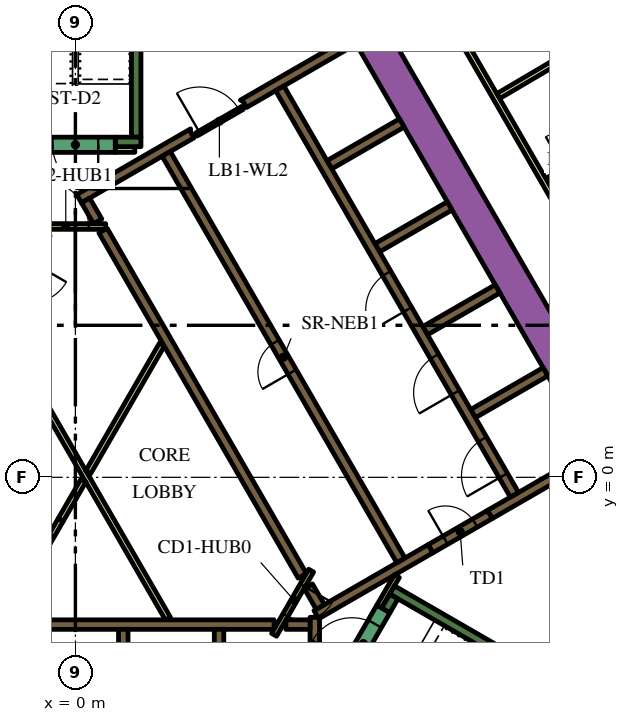
"""IFC4 building model, lengths in metres.
Left out: names, types, materials, properties, quantities, classifications, styles, units other than length and angle.
Written with IfcOpenShell. Run it as: python <this file> out.ifc"""

import sys

from ifc_helpers import new_model, si_unit, direction, frame, frame_2d, origin, place, context, subcontext, project, spatial, polyline, rectangle, outline, extrude, element, fill, save


model = new_model("IFC4")
c1 = context("Model", 3, precision=1e-05, world=origin(), true_north=direction((0.0, 1.0)))
c2 = subcontext(c1, "Body", "Model", "MODEL_VIEW")
j1 = project(units=[si_unit("LENGTHUNIT", "METRE"), si_unit("PLANEANGLEUNIT", "RADIAN")], contexts=[c1])
p1 = place(None, origin())
s1 = spatial("IfcSite", under=j1, at=p1, CompositionType="ELEMENT")
p2 = place(p1, origin())
s2 = spatial("IfcBuilding", under=s1, at=p2, CompositionType="ELEMENT")
p3 = place(p2, frame((0.0, 0.0, 47.1)))
s3 = spatial("IfcBuildingStorey", under=s2, at=p3, CompositionType="ELEMENT", Elevation=47.1)
p4 = place(p3, frame((6.776, 13.364, 0.0), z_axis=(0.0, 0.0, 1.0), x_axis=(0.500004177138, -0.8660229921, 0.0)))
e1 = element("IfcWall", 1, at=p4, inside=s3, PredefinedType="SOLIDWALL", context=c2, shape_type="SweptSolid", body=[
    extrude(rectangle(XDim=20.204, YDim=0.9, at=frame_2d((10.102, 0.0))), origin(), (0.0, 0.0, 1.0), 3.9),
])
p5 = place(p3, frame((11.943, -12.214, 0.0), z_axis=(0.0, 0.0, 1.0), x_axis=(0.49998092645, 0.866036415623, 0.0)))
e2 = element("IfcWall", 2, at=p5, inside=s3, PredefinedType="SOLIDWALL", context=c2, shape_type="SweptSolid", body=[
    extrude(rectangle(XDim=8.83, YDim=0.9, at=frame_2d((4.415, 0.0))), origin(), (0.0, 0.0, 1.0), 3.9),
])
p6 = place(p3, frame((8.334, -2.964, 0.0), z_axis=(0.0, 0.0, 1.0), x_axis=(0.866016039709, -0.500016218704, 0.0)))
e3 = element("IfcWall", 3, at=p6, inside=s3, PredefinedType="SOLIDWALL", context=c2, shape_type="SweptSolid", body=[
    extrude(rectangle(XDim=7.05, YDim=0.25, at=frame_2d((3.525, 0.0))), origin(), (0.0, 0.0, 1.0), 3.9),
])
p7 = place(p3, frame((8.168, -3.503, 0.0), z_axis=(0.0, 0.0, 1.0), x_axis=(0.49972245349, 0.866185586049, 0.0)))
e4 = element("IfcWall", 4, at=p7, inside=s3, PredefinedType="SOLIDWALL", context=c2, shape_type="SweptSolid", body=[
    extrude(rectangle(XDim=0.425, YDim=0.25, at=frame_2d((0.212, 0.0))), origin(), (0.0, 0.0, 1.0), 3.9),
])
p8 = place(p3, frame((1.6, 8.95, 0.0), z_axis=(0.0, 0.0, 1.0), x_axis=(0.0, 1.0, 0.0)))
e5 = element("IfcWall", 5, at=p8, inside=s3, PredefinedType="SOLIDWALL", context=c2, shape_type="SweptSolid", body=[
    extrude(rectangle(XDim=6.8, YDim=0.25, at=frame_2d((3.4, 0.0))), origin(), (0.0, 0.0, 1.0), 3.9),
])
p9 = place(p3, frame((1.05, 8.825, 0.0), z_axis=(0.0, 0.0, 1.0), x_axis=(1.0, 0.0, 0.0)))
e6 = element("IfcWall", 6, at=p9, inside=s3, PredefinedType="SOLIDWALL", context=c2, shape_type="SweptSolid", body=[
    extrude(rectangle(XDim=0.675, YDim=0.25, at=frame_2d((0.337, 0.0))), origin(), (0.0, 0.0, 1.0), 3.9),
])
p10 = place(p3, frame((-5.259, -3.875, 0.0), z_axis=(0.0, 0.0, 1.0), x_axis=(1.0, 0.0, 0.0)))
e7 = element("IfcWall", 7, at=p10, inside=s3, PredefinedType="SOLIDWALL", context=c2, shape_type="SweptSolid", body=[
    extrude(rectangle(XDim=10.489, YDim=0.25, at=frame_2d((5.244, 0.0))), origin(), (0.0, 0.0, 1.0), 3.9),
])
for number, where, z_axis, x_axis in (
    (8, (3.78, -4.0, 0.0), (0.0, 0.0, 1.0), (0.0, -1.0, 0.0)),
    (9, (1.26, -4.0, 0.0), (0.0, 0.0, 1.0), (0.0, -1.0, 0.0)),
):
    element("IfcWall", number, at=place(p3, frame(where, z_axis=z_axis, x_axis=x_axis)), inside=s3, PredefinedType="SOLIDWALL", context=c2, shape_type="SweptSolid", body=[
        extrude(rectangle(XDim=2.2, YDim=0.25, at=frame_2d((1.1, 0.0))), origin(), (0.0, 0.0, 1.0), 3.9),
    ])
p11 = place(p3, frame((6.3, -7.27, 0.0), z_axis=(0.0, 0.0, 1.0), x_axis=(0.0, 1.0, 0.0)))
e10 = element("IfcWall", 10, at=p11, inside=s3, PredefinedType="SOLIDWALL", context=c2, shape_type="SweptSolid", body=[
    extrude(rectangle(XDim=3.586, YDim=0.25, at=frame_2d((1.793, 0.0))), origin(), (0.0, 0.0, 1.0), 3.9),
])
p12 = place(p3, frame((5.538, -3.875, 0.0), z_axis=(0.0, 0.0, 1.0), x_axis=(1.0, 0.0, 0.0)))
e11 = element("IfcWall", 11, at=p12, inside=s3, PredefinedType="SOLIDWALL", context=c2, shape_type="SweptSolid", body=[
    extrude(rectangle(XDim=0.637, YDim=0.25, at=frame_2d((0.318, 0.0))), origin(), (0.0, 0.0, 1.0), 3.9),
])
p13 = place(p3, frame((10.464, 1.677, 0.0), z_axis=(0.0, 0.0, 1.0), x_axis=(0.86605622881, 0.499946605688, 0.0)))
e12 = element("IfcWall", 12, at=p13, inside=s3, PredefinedType="SOLIDWALL", context=c2, shape_type="SweptSolid", body=[
    extrude(rectangle(XDim=2.2, YDim=0.25, at=frame_2d((1.1, 0.0))), origin(), (0.0, 0.0, 1.0), 3.9),
])
p14 = place(p3, frame((13.629, 0.594, 0.0), z_axis=(0.0, 0.0, 1.0), x_axis=(-0.86602790099, -0.499995674689, 0.0)))
e13 = element("IfcWall", 13, at=p14, inside=s3, PredefinedType="SOLIDWALL", context=c2, shape_type="SweptSolid", body=[
    extrude(rectangle(XDim=3.146, YDim=0.25, at=frame_2d((1.573, 0.0))), origin(), (0.0, 0.0, 1.0), 3.9),
])
p15 = place(p3, frame((9.346, -1.879, 0.0), z_axis=(0.0, 0.0, 1.0), x_axis=(-0.866048528039, -0.499959945477, 0.0)))
e14 = element("IfcWall", 14, at=p15, inside=s3, PredefinedType="SOLIDWALL", context=c2, shape_type="SweptSolid", body=[
    extrude(rectangle(XDim=3.47, YDim=0.25, at=frame_2d((1.735, 0.0))), origin(), (0.0, 0.0, 1.0), 3.9),
])
p16 = place(p3, frame((6.13, -2.867, 0.0), z_axis=(0.0, 0.0, 1.0), x_axis=(0.500160776593, -0.865932559475, 0.0)))
e15 = element("IfcWall", 15, at=p16, inside=s3, PredefinedType="SOLIDWALL", context=c2, shape_type="SweptSolid", body=[
    extrude(rectangle(XDim=0.627, YDim=0.25, at=frame_2d((0.313, 0.0))), origin(), (0.0, 0.0, 1.0), 3.9),
])
for number, where, z_axis, x_axis in (
    (16, (9.204, 3.859, 0.0), (0.0, 0.0, 1.0), (0.866, 0.5, 0.0)),
    (17, (7.944, 6.041, 0.0), (0.0, 0.0, 1.0), (0.866, 0.5, 0.0)),
    (18, (6.684, 8.224, 0.0), (0.0, 0.0, 1.0), (0.866, 0.5, 0.0)),
):
    element("IfcWall", number, at=place(p3, frame(where, z_axis=z_axis, x_axis=x_axis)), inside=s3, PredefinedType="SOLIDWALL", context=c2, shape_type="SweptSolid", body=[
        extrude(rectangle(XDim=2.2, YDim=0.25, at=frame_2d((1.1, 0.0))), origin(), (0.0, 0.0, 1.0), 3.9),
    ])
p17 = place(p3, origin())
e19 = element("IfcWall", 19, at=p17, inside=s3, PredefinedType="SOLIDWALL", context=c2, shape_type="SweptSolid", body=[
    extrude(outline(polyline([(2.776, 8.733), (2.499, 8.573), (2.498, 8.573), (2.498, 8.573), (2.282, 8.448), (2.282, 8.448), (0.377, 7.348), (0.16, 7.223), (0.035, 7.439), (3.032, 9.169), (3.03, 9.152), (3.03, 9.133), (3.031, 9.113), (3.035, 9.094), (3.04, 9.075), (3.047, 9.057), (3.056, 9.039), (3.119, 8.931), (2.776, 8.733)])), origin(), (0.0, 0.0, 1.0), 3.9),
])
e20 = element("IfcWall", 20, at=p17, inside=s3, PredefinedType="SOLIDWALL", context=c2, shape_type="SweptSolid", body=[
    extrude(outline(polyline([(5.27, 10.173), (5.27, 10.173), (4.683, 9.834), (4.504, 9.731), (4.442, 9.839), (4.431, 9.856), (4.419, 9.871), (4.406, 9.885), (4.39, 9.898), (4.374, 9.909), (4.357, 9.918), (4.341, 9.925), (7.266, 11.614), (7.391, 11.398), (5.486, 10.298), (5.486, 10.298), (5.27, 10.173), (5.27, 10.173)])), origin(), (0.0, 0.0, 1.0), 3.9),
])
p18 = place(p3, frame((0.268, 7.285, 0.0), z_axis=(0.0, 0.0, 1.0), x_axis=(0.500098681536, -0.865968422476, 0.0)))
e21 = element("IfcWall", 21, at=p18, inside=s3, PredefinedType="SOLIDWALL", context=c2, shape_type="SweptSolid", body=[
    extrude(rectangle(XDim=0.636, YDim=0.25, at=frame_2d((0.318, 0.0))), origin(), (0.0, 0.0, 1.0), 3.9),
])
p19 = place(p3, frame((5.97, -2.591, 0.0), z_axis=(0.0, 0.0, 1.0), x_axis=(-0.499994469932, 0.866028596547, 0.0)))
e22 = element("IfcWall", 22, at=p19, inside=s3, PredefinedType="SOLIDWALL", context=c2, shape_type="SweptSolid", body=[
    extrude(rectangle(XDim=10.488, YDim=0.25, at=frame_2d((5.244, 0.0))), origin(), (0.0, 0.0, 1.0), 3.9),
])
p20 = place(p3, frame((8.459, -2.599, 0.0), z_axis=(0.0, 0.0, 1.0), x_axis=(-0.500041054325, -0.866001699761, 0.0)))
e23 = element("IfcWall", 23, at=p20, inside=s3, PredefinedType="PARTITIONING", context=c2, shape_type="SweptSolid", body=[
    extrude(rectangle(XDim=0.929, YDim=0.15, at=frame_2d((0.464, 0.0))), origin(), (0.0, 0.0, 1.0), 3.9),
])
p21 = place(p3, frame((2.435, -3.718, 0.0), z_axis=(0.0, 0.0, 1.0), x_axis=(-0.499985176046, 0.866033962229, 0.0)))
e24 = element("IfcWall", 24, at=p21, inside=s3, PredefinedType="PARTITIONING", context=c2, shape_type="SweptSolid", body=[
    extrude(rectangle(XDim=8.875, YDim=0.15, at=frame_2d((4.438, 0.0))), origin(), (0.0, 0.0, 1.0), 2.75),
])
p22 = place(p3, frame((0.336, 0.132, 0.0), z_axis=(0.0, 0.0, 1.0), x_axis=(0.500001957507, 0.866024273614, 0.0)))
e25 = element("IfcWall", 25, at=p22, inside=s3, PredefinedType="PARTITIONING", context=c2, shape_type="SweptSolid", body=[
    extrude(rectangle(XDim=3.881, YDim=0.15, at=frame_2d((1.941, 0.0))), origin(), (0.0, 0.0, 1.0), 2.75),
])
p23 = place(p3, frame((-0.387, -1.121, 0.0), z_axis=(0.0, 0.0, 1.0), x_axis=(0.500057179532, 0.865992388649, 0.0)))
e26 = element("IfcWall", 26, at=p23, inside=s3, PredefinedType="PARTITIONING", context=c2, shape_type="SweptSolid", body=[
    extrude(rectangle(XDim=1.199, YDim=0.15, at=frame_2d((0.6, 0.0))), origin(), (0.0, 0.0, 1.0), 2.75),
])
p24 = place(p3, frame((1.05, 8.625, 0.0), z_axis=(0.0, 0.0, 1.0), x_axis=(1.0, 0.0, 0.0)))
e27 = element("IfcWall", 27, at=p24, inside=s3, PredefinedType="PARTITIONING", context=c2, shape_type="SweptSolid", body=[
    extrude(rectangle(XDim=0.514, YDim=0.15, at=frame_2d((0.257, 0.0))), origin(), (0.0, 0.0, 1.0), 2.75),
])
p25 = place(p3, frame((11.553, -0.46, 0.0), z_axis=(0.0, 0.0, 1.0), x_axis=(-0.500006514828, 0.866021642414, 0.0)))
e28 = element("IfcWall", 28, at=p25, inside=s3, PredefinedType="SOLIDWALL", context=c2, shape_type="SweptSolid", body=[
    extrude(rectangle(XDim=12.35, YDim=0.25, at=frame_2d((6.175, 0.0))), origin(), (0.0, 0.0, 1.0), 3.9),
])
p26 = place(p25, frame((0.585, 0.0, 0.0)))
e29 = element("IfcOpeningElement", 29, at=p26, cuts=e28, PredefinedType="OPENING", context=c2, shape_type="SweptSolid", body=[
    extrude(rectangle(XDim=1.1, YDim=2.1, at=frame_2d((0.55, 1.05))), frame((0.0, 0.135, 0.0), z_axis=(0.0, -1.0, 0.0), x_axis=(1.0, 0.0, 0.0)), (0.0, 0.0, 1.0), 0.27),
])
p27 = place(p25, frame((3.105, 0.0, 0.0)))
e30 = element("IfcOpeningElement", 30, at=p27, cuts=e28, PredefinedType="OPENING", context=c2, shape_type="SweptSolid", body=[
    extrude(rectangle(XDim=1.1, YDim=2.1, at=frame_2d((0.55, 1.05))), frame((0.0, 0.135, 0.0), z_axis=(0.0, -1.0, 0.0), x_axis=(1.0, 0.0, 0.0)), (0.0, 0.0, 1.0), 0.27),
])
p28 = place(p25, frame((5.625, 0.0, 0.0)))
e31 = element("IfcOpeningElement", 31, at=p28, cuts=e28, PredefinedType="OPENING", context=c2, shape_type="SweptSolid", body=[
    extrude(rectangle(XDim=1.1, YDim=2.1, at=frame_2d((0.55, 1.05))), frame((0.0, 0.135, 0.0), z_axis=(0.0, -1.0, 0.0), x_axis=(1.0, 0.0, 0.0)), (0.0, 0.0, 1.0), 0.27),
])
p29 = place(p3, frame((8.565, -2.185, 0.0), z_axis=(0.0, 0.0, 1.0), x_axis=(-0.499997954832, 0.866026584559, 0.0)))
e32 = element("IfcWall", 32, at=p29, inside=s3, PredefinedType="SOLIDWALL", context=c2, shape_type="SweptSolid", body=[
    extrude(rectangle(XDim=12.35, YDim=0.25, at=frame_2d((6.175, 0.0))), origin(), (0.0, 0.0, 1.0), 3.9),
])
p30 = place(p29, frame((5.725, 0.0, 0.0)))
e33 = element("IfcOpeningElement", 33, at=p30, cuts=e32, PredefinedType="OPENING", context=c2, shape_type="SweptSolid", body=[
    extrude(rectangle(XDim=0.9, YDim=2.1, at=frame_2d((0.45, 1.05))), frame((0.0, 0.135, 0.0), z_axis=(0.0, -1.0, 0.0), x_axis=(1.0, 0.0, 0.0)), (0.0, 0.0, 1.0), 0.27),
])
p31 = place(p3, frame((7.053, -5.284, 0.0), z_axis=(0.0, 0.0, 1.0), x_axis=(0.500078061341, 0.865980330357, 0.0)))
e34 = element("IfcWall", 34, at=p31, inside=s3, PredefinedType="SOLIDWALL", context=c2, shape_type="SweptSolid", body=[
    extrude(rectangle(XDim=2.1, YDim=0.4, at=frame_2d((1.05, 0.0))), origin(), (0.0, 0.0, 1.0), 3.9),
])
p32 = place(p31, frame((0.45, 0.0, 0.0)))
e35 = element("IfcOpeningElement", 35, at=p32, cuts=e34, PredefinedType="OPENING", context=c2, shape_type="SweptSolid", body=[
    extrude(rectangle(XDim=1.2, YDim=2.1, at=frame_2d((0.6, 1.05))), frame((0.0, 0.21, 0.0), z_axis=(0.0, -1.0, 0.0), x_axis=(1.0, 0.0, 0.0)), (0.0, 0.0, 1.0), 0.42),
])
p33 = place(p3, frame((9.346, -1.879, 0.0), z_axis=(0.0, 0.0, 1.0), x_axis=(0.866047807691, 0.499961193289, 0.0)))
e36 = element("IfcWall", 36, at=p33, inside=s3, PredefinedType="SOLIDWALL", context=c2, shape_type="SweptSolid", body=[
    extrude(rectangle(XDim=1.8, YDim=0.25, at=frame_2d((0.9, 0.0))), origin(), (0.0, 0.0, 1.0), 3.9),
])
p34 = place(p33, frame((0.45, 0.0, 0.0)))
e37 = element("IfcOpeningElement", 37, at=p34, cuts=e36, PredefinedType="OPENING", context=c2, shape_type="SweptSolid", body=[
    extrude(rectangle(XDim=0.9, YDim=2.1, at=frame_2d((0.45, 1.05))), frame((0.0, 0.135, 0.0), z_axis=(0.0, -1.0, 0.0), x_axis=(1.0, 0.0, 0.0)), (0.0, 0.0, 1.0), 0.27),
])
p35 = place(p3, frame((1.05, 8.75, 0.0), z_axis=(0.0, 0.0, 1.0), x_axis=(-1.0, 0.0, 0.0)))
e38 = element("IfcWall", 38, at=p35, inside=s3, PredefinedType="SOLIDWALL", context=c2, shape_type="SweptSolid", body=[
    extrude(rectangle(XDim=2.1, YDim=0.4, at=frame_2d((1.05, 0.0))), origin(), (0.0, 0.0, 1.0), 3.9),
])
p36 = place(p35, frame((0.45, 0.0, 0.0)))
e39 = element("IfcOpeningElement", 39, at=p36, cuts=e38, PredefinedType="OPENING", context=c2, shape_type="SweptSolid", body=[
    extrude(rectangle(XDim=1.2, YDim=2.1, at=frame_2d((0.6, 1.05))), frame((0.0, 0.21, 0.0), z_axis=(0.0, -1.0, 0.0), x_axis=(1.0, 0.0, 0.0)), (0.0, 0.0, 1.0), 0.42),
])
p37 = place(p3, frame((6.203, -2.456, 0.0), z_axis=(0.0, 0.0, 1.0), x_axis=(-0.500043961785, -0.866000020948, 0.0)))
e40 = element("IfcWall", 40, at=p37, inside=s3, PredefinedType="PARTITIONING", context=c2, shape_type="SweptSolid", body=[
    extrude(rectangle(XDim=1.95, YDim=0.15, at=frame_2d((0.975, 0.0))), origin(), (0.0, 0.0, 1.0), 3.9),
])
p38 = place(p37, frame((0.45, 0.0, 0.0)))
e41 = element("IfcOpeningElement", 41, at=p38, cuts=e40, PredefinedType="OPENING", context=c2, shape_type="SweptSolid", body=[
    extrude(rectangle(XDim=0.9, YDim=2.1, at=frame_2d((0.45, 1.05))), frame((0.0, 0.085, 0.0), z_axis=(0.0, -1.0, 0.0), x_axis=(1.0, 0.0, 0.0)), (0.0, 0.0, 1.0), 0.17),
])
p39 = place(p3, frame((-1.303, 6.6, 0.0), z_axis=(0.0, 0.0, 1.0), x_axis=(1.0, 0.0, 0.0)))
e42 = element("IfcWall", 42, at=p39, inside=s3, PredefinedType="PARTITIONING", context=c2, shape_type="SweptSolid", body=[
    extrude(rectangle(XDim=2.1, YDim=0.15, at=frame_2d((1.05, 0.0))), origin(), (0.0, 0.0, 1.0), 3.9),
])
p40 = place(p39, frame((0.45, 0.0, 0.0)))
e43 = element("IfcOpeningElement", 43, at=p40, cuts=e42, PredefinedType="OPENING", context=c2, shape_type="SweptSolid", body=[
    extrude(rectangle(XDim=1.2, YDim=2.1, at=frame_2d((0.6, 1.05))), frame((0.0, 0.085, 0.0), z_axis=(0.0, -1.0, 0.0), x_axis=(1.0, 0.0, 0.0)), (0.0, 0.0, 1.0), 0.17),
])
p41 = place(p3, frame((3.183, 9.02, 0.0), z_axis=(0.0, 0.0, 1.0), x_axis=(0.866034573852, 0.49998411664, 0.0)))
e44 = element("IfcWall", 44, at=p41, inside=s3, PredefinedType="PARTITIONING", context=c2, shape_type="SweptSolid", body=[
    extrude(rectangle(XDim=1.4, YDim=0.09, at=frame_2d((0.7, 0.0))), origin(), (0.0, 0.0, 1.0), 2.75),
])
p42 = place(p41, frame((0.1, 0.0, 0.0)))
e45 = element("IfcOpeningElement", 45, at=p42, cuts=e44, PredefinedType="OPENING", context=c2, shape_type="SweptSolid", body=[
    extrude(rectangle(XDim=1.2, YDim=2.1, at=frame_2d((0.6, 1.05))), frame((0.0, 0.055, 0.0), z_axis=(0.0, -1.0, 0.0), x_axis=(1.0, 0.0, 0.0)), (0.0, 0.0, 1.0), 0.11),
])
p43 = place(p3, frame((-1.287, -2.679, 0.0), z_axis=(0.0, 0.0, 1.0), x_axis=(0.499961193289, 0.866047807691, 0.0)))
e46 = element("IfcWall", 46, at=p43, inside=s3, PredefinedType="PARTITIONING", context=c2, shape_type="SweptSolid", body=[
    extrude(rectangle(XDim=1.8, YDim=0.15, at=frame_2d((0.9, 0.0))), origin(), (0.0, 0.0, 1.0), 2.75),
])
p44 = place(p43, frame((0.45, 0.0, 0.0)))
e47 = element("IfcOpeningElement", 47, at=p44, cuts=e46, PredefinedType="OPENING", context=c2, shape_type="SweptSolid", body=[
    extrude(rectangle(XDim=0.9, YDim=2.1, at=frame_2d((0.45, 1.05))), frame((0.0, 0.085, 0.0), z_axis=(0.0, -1.0, 0.0), x_axis=(1.0, 0.0, 0.0)), (0.0, 0.0, 1.0), 0.17),
])
p45 = place(p3, frame((6.163, 18.475, 0.0), z_axis=(0.0, 0.0, 1.0), x_axis=(0.500001317485, -0.866024643133, 0.0)))
e48 = element("IfcWall", 48, at=p45, inside=s3, PredefinedType="PARTITIONING", context=c2, shape_type="SweptSolid", body=[
    extrude(rectangle(XDim=25.767, YDim=0.15, at=frame_2d((12.883, 0.0))), origin(), (0.0, 0.0, 1.0), 2.75),
])
p46 = place(p45, frame((24.586, 0.0, 0.0)))
e49 = element("IfcOpeningElement", 49, at=p46, cuts=e48, PredefinedType="OPENING", context=c2, shape_type="SweptSolid", body=[
    extrude(rectangle(XDim=1.0, YDim=2.1, at=frame_2d((0.5, 1.05))), frame((0.0, 0.085, 0.0), z_axis=(0.0, -1.0, 0.0), x_axis=(1.0, 0.0, 0.0)), (0.0, 0.0, 1.0), 0.17),
])
p47 = place(p45, frame((16.196, 0.0, 0.0)))
e50 = element("IfcOpeningElement", 50, at=p47, cuts=e48, PredefinedType="OPENING", context=c2, shape_type="SweptSolid", body=[
    extrude(rectangle(XDim=1.0, YDim=2.1, at=frame_2d((0.5, 1.05))), frame((0.0, 0.085, 0.0), z_axis=(0.0, -1.0, 0.0), x_axis=(1.0, 0.0, 0.0)), (0.0, 0.0, 1.0), 0.17),
])
p48 = place(p45, frame((14.789, 0.0, 0.0)))
e51 = element("IfcOpeningElement", 51, at=p48, cuts=e48, PredefinedType="OPENING", context=c2, shape_type="SweptSolid", body=[
    extrude(rectangle(XDim=1.1, YDim=2.1, at=frame_2d((0.55, 1.05))), frame((0.0, 0.085, 0.0), z_axis=(0.0, -1.0, 0.0), x_axis=(1.0, 0.0, 0.0)), (0.0, 0.0, 1.0), 0.17),
])
p49 = place(p45, frame((3.698, 0.0, 0.0)))
e52 = element("IfcOpeningElement", 52, at=p49, cuts=e48, PredefinedType="OPENING", context=c2, shape_type="SweptSolid", body=[
    extrude(rectangle(XDim=1.0, YDim=2.1, at=frame_2d((0.5, 1.05))), frame((0.0, 0.085, 0.0), z_axis=(0.0, -1.0, 0.0), x_axis=(1.0, 0.0, 0.0)), (0.0, 0.0, 1.0), 0.17),
])
p50 = place(p45, frame((2.391, 0.0, 0.0)))
e53 = element("IfcOpeningElement", 53, at=p50, cuts=e48, PredefinedType="OPENING", context=c2, shape_type="SweptSolid", body=[
    extrude(rectangle(XDim=1.0, YDim=2.1, at=frame_2d((0.5, 1.05))), frame((0.0, 0.085, 0.0), z_axis=(0.0, -1.0, 0.0), x_axis=(1.0, 0.0, 0.0)), (0.0, 0.0, 1.0), 0.17),
])
p51 = place(p3, frame((17.856, 13.999, 0.0), z_axis=(0.0, 0.0, 1.0), x_axis=(-0.861371519381, -0.507975497047, 0.0)))
e54 = element("IfcWall", 54, at=p51, inside=s3, PredefinedType="PARTITIONING", context=c2, shape_type="SweptSolid", body=[
    extrude(rectangle(XDim=7.804, YDim=0.15, at=frame_2d((3.902, 0.0))), origin(), (0.0, 0.0, 1.0), 2.75),
])
p52 = place(p3, frame((12.402, 7.819, 0.0), z_axis=(0.0, 0.0, 1.0), x_axis=(0.866034573852, 0.49998411664, 0.0)))
e55 = element("IfcWall", 55, at=p52, inside=s3, PredefinedType="PARTITIONING", context=c2, shape_type="SweptSolid", body=[
    extrude(rectangle(XDim=2.8, YDim=0.1, at=frame_2d((1.4, 0.0))), origin(), (0.0, 0.0, 1.0), 2.75),
])
p53 = place(p52, frame((0.55, 0.0, 0.0)))
e56 = element("IfcOpeningElement", 56, at=p53, cuts=e55, PredefinedType="OPENING", context=c2, shape_type="SweptSolid", body=[
    extrude(rectangle(XDim=1.0, YDim=2.1, at=frame_2d((0.5, 1.05))), frame((0.0, 0.06, 0.0), z_axis=(0.0, -1.0, 0.0), x_axis=(1.0, 0.0, 0.0)), (0.0, 0.0, 1.0), 0.12),
])
p54 = place(p26, origin())
e57 = element("IfcDoor", 57, at=p54, inside=s3, OperationType="DOUBLE_DOOR_SLIDING", PredefinedType="DOOR", context=c2, shape_type="SweptSolid", body=[
    extrude(rectangle(XDim=1.1, YDim=2.1, at=frame_2d((0.55, 1.05))), frame((0.0, 0.025, 0.0), z_axis=(0.0, -1.0, 0.0), x_axis=(1.0, 0.0, 0.0)), (0.0, 0.0, 1.0), 0.05),
])
fill(e29, e57)
p55 = place(p27, origin())
e58 = element("IfcDoor", 58, at=p55, inside=s3, OperationType="DOUBLE_DOOR_SLIDING", PredefinedType="DOOR", context=c2, shape_type="SweptSolid", body=[
    extrude(rectangle(XDim=1.1, YDim=2.1, at=frame_2d((0.55, 1.05))), frame((0.0, 0.025, 0.0), z_axis=(0.0, -1.0, 0.0), x_axis=(1.0, 0.0, 0.0)), (0.0, 0.0, 1.0), 0.05),
])
fill(e30, e58)
p56 = place(p28, origin())
e59 = element("IfcDoor", 59, at=p56, inside=s3, OperationType="DOUBLE_DOOR_SLIDING", PredefinedType="DOOR", context=c2, shape_type="SweptSolid", body=[
    extrude(rectangle(XDim=1.1, YDim=2.1, at=frame_2d((0.55, 1.05))), frame((0.0, 0.025, 0.0), z_axis=(0.0, -1.0, 0.0), x_axis=(1.0, 0.0, 0.0)), (0.0, 0.0, 1.0), 0.05),
])
fill(e31, e59)
p57 = place(p30, origin())
e60 = element("IfcDoor", 60, at=p57, inside=s3, OperationType="SINGLE_SWING_LEFT", PredefinedType="DOOR", context=c2, shape_type="SweptSolid", body=[
    extrude(rectangle(XDim=0.9, YDim=2.1, at=frame_2d((0.45, 1.05))), frame((0.0, 0.025, 0.0), z_axis=(0.0, -1.0, 0.0), x_axis=(1.0, 0.0, 0.0)), (0.0, 0.0, 1.0), 0.05),
])
fill(e33, e60)
p58 = place(p32, origin())
e61 = element("IfcDoor", 61, at=p58, inside=s3, OperationType="SINGLE_SWING_LEFT", PredefinedType="DOOR", context=c2, shape_type="SweptSolid", body=[
    extrude(rectangle(XDim=1.2, YDim=2.1, at=frame_2d((0.6, 1.05))), frame((0.0, 0.025, 0.0), z_axis=(0.0, -1.0, 0.0), x_axis=(1.0, 0.0, 0.0)), (0.0, 0.0, 1.0), 0.05),
])
fill(e35, e61)
p59 = place(p34, origin())
e62 = element("IfcDoor", 62, at=p59, inside=s3, OperationType="SINGLE_SWING_LEFT", PredefinedType="DOOR", context=c2, shape_type="SweptSolid", body=[
    extrude(rectangle(XDim=0.9, YDim=2.1, at=frame_2d((0.45, 1.05))), frame((0.0, 0.025, 0.0), z_axis=(0.0, -1.0, 0.0), x_axis=(1.0, 0.0, 0.0)), (0.0, 0.0, 1.0), 0.05),
])
fill(e37, e62)
p60 = place(p36, origin())
e63 = element("IfcDoor", 63, at=p60, inside=s3, OperationType="SINGLE_SWING_LEFT", PredefinedType="DOOR", context=c2, shape_type="SweptSolid", body=[
    extrude(rectangle(XDim=1.2, YDim=2.1, at=frame_2d((0.6, 1.05))), frame((0.0, 0.025, 0.0), z_axis=(0.0, -1.0, 0.0), x_axis=(1.0, 0.0, 0.0)), (0.0, 0.0, 1.0), 0.05),
])
fill(e39, e63)
p61 = place(p38, origin())
e64 = element("IfcDoor", 64, at=p61, inside=s3, OperationType="SINGLE_SWING_LEFT", PredefinedType="DOOR", context=c2, shape_type="SweptSolid", body=[
    extrude(rectangle(XDim=0.9, YDim=2.1, at=frame_2d((0.45, 1.05))), frame((0.0, 0.025, 0.0), z_axis=(0.0, -1.0, 0.0), x_axis=(1.0, 0.0, 0.0)), (0.0, 0.0, 1.0), 0.05),
])
fill(e41, e64)
p62 = place(p40, origin())
e65 = element("IfcDoor", 65, at=p62, inside=s3, OperationType="SINGLE_SWING_LEFT", PredefinedType="DOOR", context=c2, shape_type="SweptSolid", body=[
    extrude(rectangle(XDim=1.2, YDim=2.1, at=frame_2d((0.6, 1.05))), frame((0.0, 0.025, 0.0), z_axis=(0.0, -1.0, 0.0), x_axis=(1.0, 0.0, 0.0)), (0.0, 0.0, 1.0), 0.05),
])
fill(e43, e65)
p63 = place(p42, origin())
e66 = element("IfcDoor", 66, at=p63, inside=s3, OperationType="SINGLE_SWING_LEFT", PredefinedType="DOOR", context=c2, shape_type="SweptSolid", body=[
    extrude(rectangle(XDim=1.2, YDim=2.1, at=frame_2d((0.6, 1.05))), frame((0.0, 0.025, 0.0), z_axis=(0.0, -1.0, 0.0), x_axis=(1.0, 0.0, 0.0)), (0.0, 0.0, 1.0), 0.05),
])
fill(e45, e66)
p64 = place(p44, origin())
e67 = element("IfcDoor", 67, at=p64, inside=s3, OperationType="SINGLE_SWING_LEFT", PredefinedType="DOOR", context=c2, shape_type="SweptSolid", body=[
    extrude(rectangle(XDim=0.9, YDim=2.1, at=frame_2d((0.45, 1.05))), frame((0.0, 0.025, 0.0), z_axis=(0.0, -1.0, 0.0), x_axis=(1.0, 0.0, 0.0)), (0.0, 0.0, 1.0), 0.05),
])
fill(e47, e67)
save(model, sys.argv[1])
